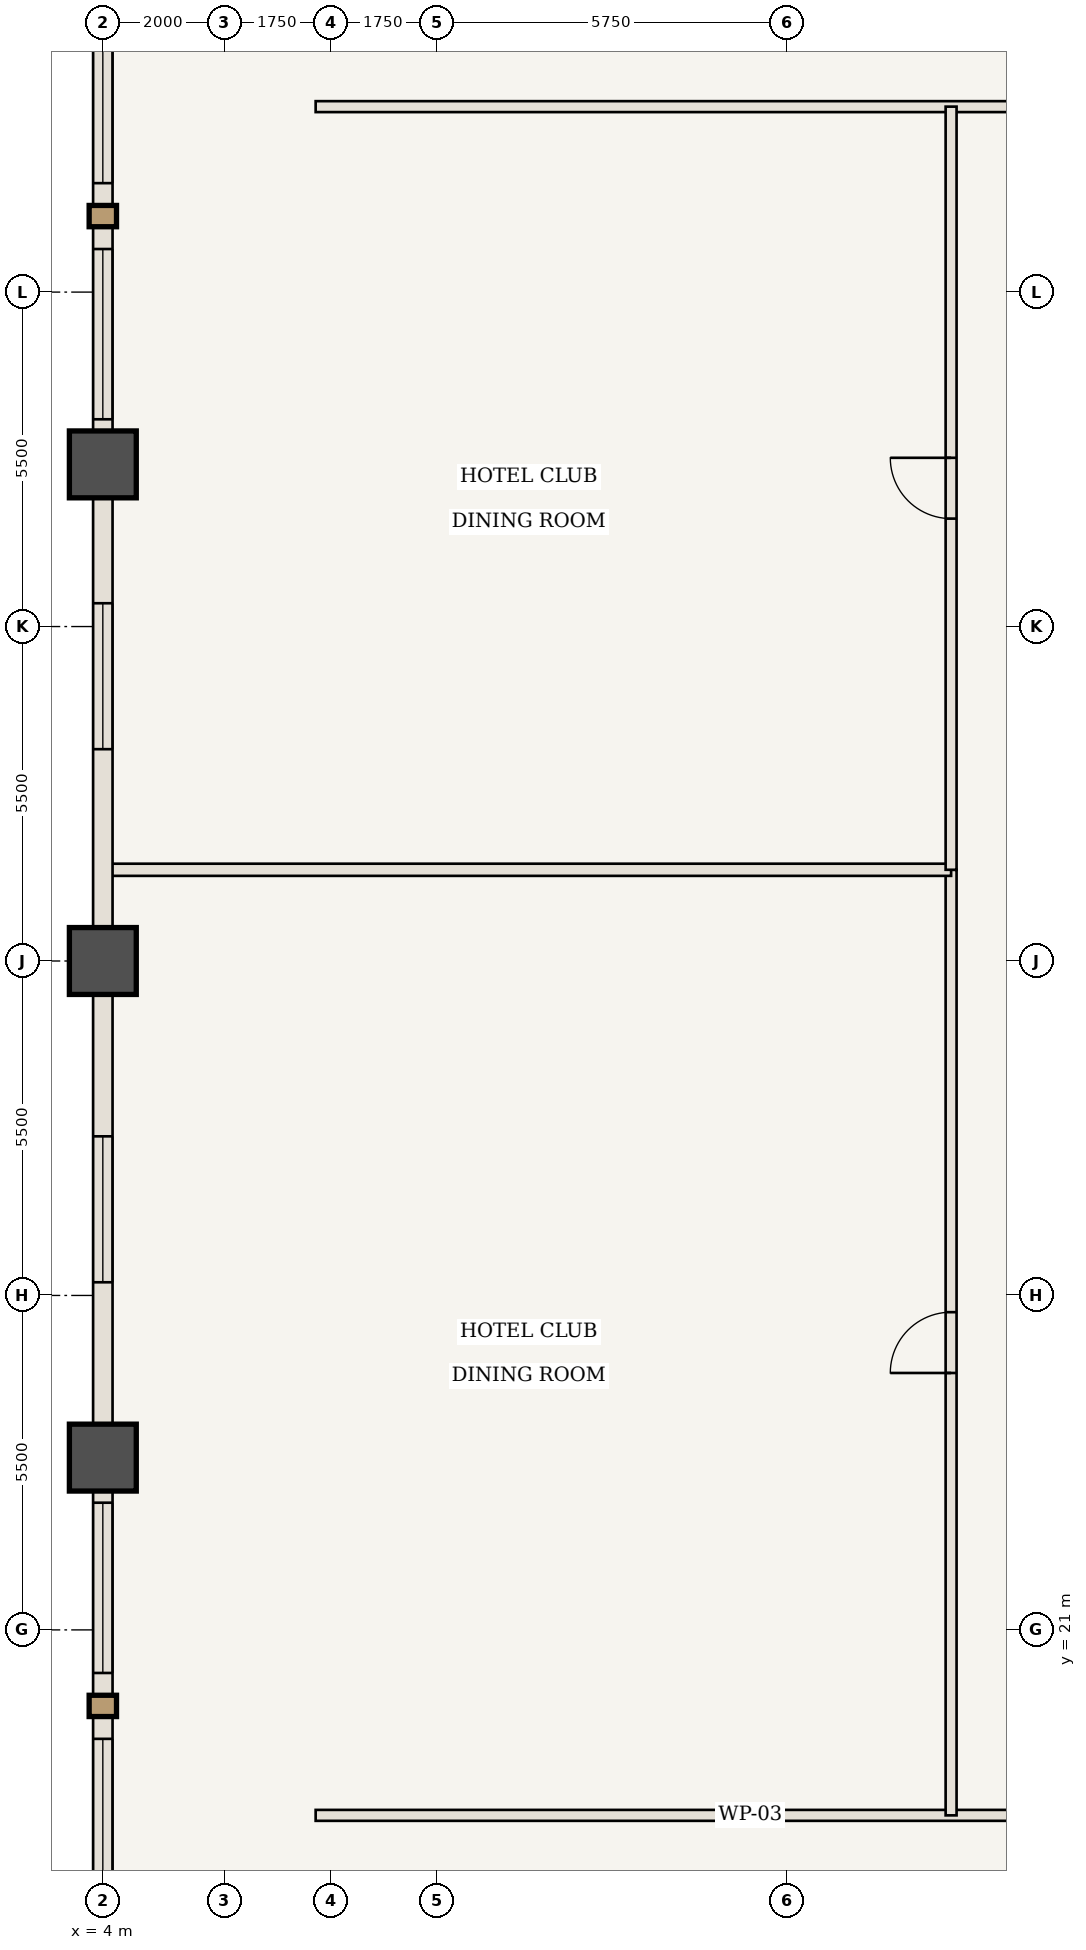
"""IFC4 building model, lengths in metres.
Left out: names, types, materials, properties, quantities, classifications, styles, units other than length and angle.
Written with IfcOpenShell. Run it as: python <this file> out.ifc"""

import sys

from ifc_helpers import new_model, si_unit, direction, frame, frame_2d, origin, origin_2d, place, context, subcontext, project, spatial, rectangle, extrude, element, fill, save


model = new_model("IFC4")
c1 = context("Model", 3, precision=1e-05, world=origin(), true_north=direction((0.0, 1.0)))
c2 = subcontext(c1, "Body", "Model", "MODEL_VIEW")
j1 = project(units=[si_unit("LENGTHUNIT", "METRE"), si_unit("PLANEANGLEUNIT", "RADIAN")], contexts=[c1])
p1 = place(None, origin())
s1 = spatial("IfcSite", under=j1, at=p1, CompositionType="ELEMENT")
p2 = place(p1, origin())
s2 = spatial("IfcBuilding", under=s1, at=p2, CompositionType="ELEMENT")
p3 = place(p2, frame((0.0, 0.0, 73.85)))
s3 = spatial("IfcBuildingStorey", under=s2, at=p3, CompositionType="ELEMENT", Elevation=73.85)
for number, where, z_axis, x_axis in (
    (1, (4.0, 23.833, 0.0), (0.0, 0.0, 1.0), (1.0, 0.0, 0.0)),
    (2, (4.0, 32.0, 0.0), (0.0, 0.0, 1.0), (1.0, 0.0, 0.0)),
    (3, (4.0, 40.167, 0.0), (0.0, 0.0, 1.0), (1.0, 0.0, 0.0)),
):
    element("IfcColumn", number, at=place(p3, frame(where, z_axis=z_axis, x_axis=x_axis)), inside=s3, PredefinedType="COLUMN", context=c2, shape_type="SweptSolid", body=[
        extrude(rectangle(XDim=1.1, YDim=1.1, at=origin_2d()), origin(), (0.0, 0.0, 1.0), 3.5),
    ])
p4 = place(p3, frame((7.5, 17.95, 0.0), z_axis=(0.0, 0.0, 1.0), x_axis=(1.0, 0.0, 0.0)))
e4 = element("IfcWall", 4, at=p4, inside=s3, PredefinedType="STANDARD", context=c2, shape_type="SweptSolid", body=[
    extrude(rectangle(XDim=14.3, YDim=0.18, at=frame_2d((7.15, 0.0))), origin(), (0.0, 0.0, 1.0), 3.24),
])
p5 = place(p4, frame((11.9, 0.0, 0.0)))
e5 = element("IfcOpeningElement", 5, at=p5, cuts=e4, PredefinedType="OPENING", context=c2, shape_type="SweptSolid", body=[
    extrude(rectangle(XDim=1.0, YDim=2.15, at=frame_2d((0.5, 1.075))), frame((0.0, 0.1, 0.0), z_axis=(0.0, -1.0, 0.0), x_axis=(1.0, 0.0, 0.0)), (0.0, 0.0, 1.0), 0.2),
])
p6 = place(p3, frame((7.5, 46.05, 0.0), z_axis=(0.0, 0.0, 1.0), x_axis=(1.0, 0.0, 0.0)))
e6 = element("IfcWall", 6, at=p6, inside=s3, PredefinedType="STANDARD", context=c2, shape_type="SweptSolid", body=[
    extrude(rectangle(XDim=16.7, YDim=0.18, at=frame_2d((8.35, 0.0))), origin(), (0.0, 0.0, 1.0), 3.24),
])
p7 = place(p6, frame((11.65, 0.0, 0.0)))
e7 = element("IfcOpeningElement", 7, at=p7, cuts=e6, PredefinedType="OPENING", context=c2, shape_type="SweptSolid", body=[
    extrude(rectangle(XDim=1.0, YDim=2.15, at=frame_2d((0.5, 1.075))), frame((0.0, 0.1, 0.0), z_axis=(0.0, -1.0, 0.0), x_axis=(1.0, 0.0, 0.0)), (0.0, 0.0, 1.0), 0.2),
])
p8 = place(p3, frame((17.95, 17.95, 0.0), z_axis=(0.0, 0.0, 1.0), x_axis=(0.0, 1.0, 0.0)))
e8 = element("IfcWall", 8, at=p8, inside=s3, PredefinedType="STANDARD", context=c2, shape_type="SweptSolid", body=[
    extrude(rectangle(XDim=15.55, YDim=0.18, at=frame_2d((7.775, 0.0))), origin(), (0.0, 0.0, 1.0), 3.24),
])
p9 = place(p8, frame((7.275, 0.0, 0.0)))
e9 = element("IfcOpeningElement", 9, at=p9, cuts=e8, PredefinedType="OPENING", context=c2, shape_type="SweptSolid", body=[
    extrude(rectangle(XDim=1.0, YDim=2.15, at=frame_2d((0.5, 1.075))), frame((0.0, 0.1, 0.0), z_axis=(0.0, -1.0, 0.0), x_axis=(1.0, 0.0, 0.0)), (0.0, 0.0, 1.0), 0.2),
])
p10 = place(p3, frame((4.06, 33.5, 0.0), z_axis=(0.0, 0.0, 1.0), x_axis=(1.0, 0.0, 0.0)))
e10 = element("IfcWall", 10, at=p10, inside=s3, PredefinedType="STANDARD", context=c2, shape_type="SweptSolid", body=[
    extrude(rectangle(XDim=13.89, YDim=0.2, at=frame_2d((6.945, 0.0))), origin(), (0.0, 0.0, 1.0), 3.24),
])
p11 = place(p3, frame((17.95, 33.5, 0.0), z_axis=(0.0, 0.0, 1.0), x_axis=(0.0, 1.0, 0.0)))
e11 = element("IfcWall", 11, at=p11, inside=s3, PredefinedType="STANDARD", context=c2, shape_type="SweptSolid", body=[
    extrude(rectangle(XDim=12.55, YDim=0.18, at=frame_2d((6.275, 0.0))), origin(), (0.0, 0.0, 1.0), 3.24),
])
p12 = place(p11, frame((5.775, 0.0, 0.0)))
e12 = element("IfcOpeningElement", 12, at=p12, cuts=e11, PredefinedType="OPENING", context=c2, shape_type="SweptSolid", body=[
    extrude(rectangle(XDim=1.0, YDim=2.15, at=frame_2d((0.5, 1.075))), frame((0.0, 0.1, 0.0), z_axis=(0.0, -1.0, 0.0), x_axis=(1.0, 0.0, 0.0)), (0.0, 0.0, 1.0), 0.2),
])
p13 = place(p3, frame((4.0, 15.667, 0.0), z_axis=(0.0, 0.0, 1.0), x_axis=(0.0, 1.0, 0.0)))
e13 = element("IfcWall", 13, at=p13, inside=s3, PredefinedType="USERDEFINED", context=c2, shape_type="SweptSolid", body=[
    extrude(rectangle(XDim=8.167, YDim=0.32, at=frame_2d((4.083, 0.0))), origin(), (0.0, 0.0, 1.0), 2.44),
])
p14 = place(p13, frame((0.742, 0.0, 0.85)))
e14 = element("IfcOpeningElement", 14, at=p14, cuts=e13, PredefinedType="OPENING", context=c2, shape_type="SweptSolid", body=[
    extrude(rectangle(XDim=2.8, YDim=1.39, at=frame_2d((1.4, 0.695))), frame((0.0, 0.17, 0.0), z_axis=(0.0, -1.0, 0.0), x_axis=(1.0, 0.0, 0.0)), (0.0, 0.0, 1.0), 0.34),
])
p15 = place(p13, frame((4.625, 0.0, 0.85)))
e15 = element("IfcOpeningElement", 15, at=p15, cuts=e13, PredefinedType="OPENING", context=c2, shape_type="SweptSolid", body=[
    extrude(rectangle(XDim=2.8, YDim=1.39, at=frame_2d((1.4, 0.695))), frame((0.0, 0.17, 0.0), z_axis=(0.0, -1.0, 0.0), x_axis=(1.0, 0.0, 0.0)), (0.0, 0.0, 1.0), 0.34),
])
p16 = place(p3, frame((4.0, 23.833, 0.0), z_axis=(0.0, 0.0, 1.0), x_axis=(0.0, 1.0, 0.0)))
e16 = element("IfcWall", 16, at=p16, inside=s3, PredefinedType="USERDEFINED", context=c2, shape_type="SweptSolid", body=[
    extrude(rectangle(XDim=8.167, YDim=0.32, at=frame_2d((4.083, 0.0))), origin(), (0.0, 0.0, 1.0), 2.44),
])
p17 = place(p16, frame((2.883, 0.0, 0.85)))
e17 = element("IfcOpeningElement", 17, at=p17, cuts=e16, PredefinedType="OPENING", context=c2, shape_type="SweptSolid", body=[
    extrude(rectangle(XDim=2.4, YDim=1.39, at=frame_2d((1.2, 0.695))), frame((0.0, 0.17, 0.0), z_axis=(0.0, -1.0, 0.0), x_axis=(1.0, 0.0, 0.0)), (0.0, 0.0, 1.0), 0.34),
])
p18 = place(p3, frame((4.0, 32.0, 0.0), z_axis=(0.0, 0.0, 1.0), x_axis=(0.0, 1.0, 0.0)))
e18 = element("IfcWall", 18, at=p18, inside=s3, PredefinedType="USERDEFINED", context=c2, shape_type="SweptSolid", body=[
    extrude(rectangle(XDim=8.167, YDim=0.32, at=frame_2d((4.083, 0.0))), origin(), (0.0, 0.0, 1.0), 2.44),
])
p19 = place(p18, frame((3.483, 0.0, 0.85)))
e19 = element("IfcOpeningElement", 19, at=p19, cuts=e18, PredefinedType="OPENING", context=c2, shape_type="SweptSolid", body=[
    extrude(rectangle(XDim=2.4, YDim=1.39, at=frame_2d((1.2, 0.695))), frame((0.0, 0.17, 0.0), z_axis=(0.0, -1.0, 0.0), x_axis=(1.0, 0.0, 0.0)), (0.0, 0.0, 1.0), 0.34),
])
p20 = place(p3, frame((4.0, 40.167, 0.0), z_axis=(0.0, 0.0, 1.0), x_axis=(0.0, 1.0, 0.0)))
e20 = element("IfcWall", 20, at=p20, inside=s3, PredefinedType="USERDEFINED", context=c2, shape_type="SweptSolid", body=[
    extrude(rectangle(XDim=8.167, YDim=0.32, at=frame_2d((4.083, 0.0))), origin(), (0.0, 0.0, 1.0), 2.44),
])
p21 = place(p20, frame((0.742, 0.0, 0.85)))
e21 = element("IfcOpeningElement", 21, at=p21, cuts=e20, PredefinedType="OPENING", context=c2, shape_type="SweptSolid", body=[
    extrude(rectangle(XDim=2.8, YDim=1.39, at=frame_2d((1.4, 0.695))), frame((0.0, 0.17, 0.0), z_axis=(0.0, -1.0, 0.0), x_axis=(1.0, 0.0, 0.0)), (0.0, 0.0, 1.0), 0.34),
])
p22 = place(p20, frame((4.625, 0.0, 0.85)))
e22 = element("IfcOpeningElement", 22, at=p22, cuts=e20, PredefinedType="OPENING", context=c2, shape_type="SweptSolid", body=[
    extrude(rectangle(XDim=2.8, YDim=1.39, at=frame_2d((1.4, 0.695))), frame((0.0, 0.17, 0.0), z_axis=(0.0, -1.0, 0.0), x_axis=(1.0, 0.0, 0.0)), (0.0, 0.0, 1.0), 0.34),
])
p23 = place(p9, origin())
e23 = element("IfcDoor", 23, at=p23, inside=s3, OperationType="SINGLE_SWING_LEFT", PredefinedType="DOOR", context=c2, shape_type="SweptSolid", body=[
    extrude(rectangle(XDim=1.0, YDim=2.15, at=frame_2d((0.5, 1.075))), frame((0.0, 0.025, 0.0), z_axis=(0.0, -1.0, 0.0), x_axis=(1.0, 0.0, 0.0)), (0.0, 0.0, 1.0), 0.05),
])
fill(e9, e23)
p24 = place(p12, origin())
e24 = element("IfcDoor", 24, at=p24, inside=s3, OperationType="SINGLE_SWING_RIGHT", PredefinedType="DOOR", context=c2, shape_type="SweptSolid", body=[
    extrude(rectangle(XDim=1.0, YDim=2.15, at=frame_2d((0.5, 1.075))), frame((0.0, 0.025, 0.0), z_axis=(0.0, -1.0, 0.0), x_axis=(1.0, 0.0, 0.0)), (0.0, 0.0, 1.0), 0.05),
])
fill(e12, e24)
p25 = place(p14, origin())
e25 = element("IfcWindow", 25, at=p25, inside=s3, PartitioningType="SINGLE_PANEL", PredefinedType="WINDOW", context=c2, shape_type="SweptSolid", body=[
    extrude(rectangle(XDim=2.8, YDim=1.39, at=frame_2d((1.4, 0.695))), frame((0.0, 0.03, 0.0), z_axis=(0.0, -1.0, 0.0), x_axis=(1.0, 0.0, 0.0)), (0.0, 0.0, 1.0), 0.06),
])
fill(e14, e25)
p26 = place(p15, origin())
e26 = element("IfcWindow", 26, at=p26, inside=s3, PartitioningType="SINGLE_PANEL", PredefinedType="WINDOW", context=c2, shape_type="SweptSolid", body=[
    extrude(rectangle(XDim=2.8, YDim=1.39, at=frame_2d((1.4, 0.695))), frame((0.0, 0.03, 0.0), z_axis=(0.0, -1.0, 0.0), x_axis=(1.0, 0.0, 0.0)), (0.0, 0.0, 1.0), 0.06),
])
fill(e15, e26)
p27 = place(p17, origin())
e27 = element("IfcWindow", 27, at=p27, inside=s3, PartitioningType="SINGLE_PANEL", PredefinedType="WINDOW", context=c2, shape_type="SweptSolid", body=[
    extrude(rectangle(XDim=2.4, YDim=1.39, at=frame_2d((1.2, 0.695))), frame((0.0, 0.03, 0.0), z_axis=(0.0, -1.0, 0.0), x_axis=(1.0, 0.0, 0.0)), (0.0, 0.0, 1.0), 0.06),
])
fill(e17, e27)
p28 = place(p19, origin())
e28 = element("IfcWindow", 28, at=p28, inside=s3, PartitioningType="SINGLE_PANEL", PredefinedType="WINDOW", context=c2, shape_type="SweptSolid", body=[
    extrude(rectangle(XDim=2.4, YDim=1.39, at=frame_2d((1.2, 0.695))), frame((0.0, 0.03, 0.0), z_axis=(0.0, -1.0, 0.0), x_axis=(1.0, 0.0, 0.0)), (0.0, 0.0, 1.0), 0.06),
])
fill(e19, e28)
p29 = place(p21, origin())
e29 = element("IfcWindow", 29, at=p29, inside=s3, PartitioningType="SINGLE_PANEL", PredefinedType="WINDOW", context=c2, shape_type="SweptSolid", body=[
    extrude(rectangle(XDim=2.8, YDim=1.39, at=frame_2d((1.4, 0.695))), frame((0.0, 0.03, 0.0), z_axis=(0.0, -1.0, 0.0), x_axis=(1.0, 0.0, 0.0)), (0.0, 0.0, 1.0), 0.06),
])
fill(e21, e29)
p30 = place(p22, origin())
e30 = element("IfcWindow", 30, at=p30, inside=s3, PartitioningType="SINGLE_PANEL", PredefinedType="WINDOW", context=c2, shape_type="SweptSolid", body=[
    extrude(rectangle(XDim=2.8, YDim=1.39, at=frame_2d((1.4, 0.695))), frame((0.0, 0.03, 0.0), z_axis=(0.0, -1.0, 0.0), x_axis=(1.0, 0.0, 0.0)), (0.0, 0.0, 1.0), 0.06),
])
fill(e22, e30)
save(model, sys.argv[1])
